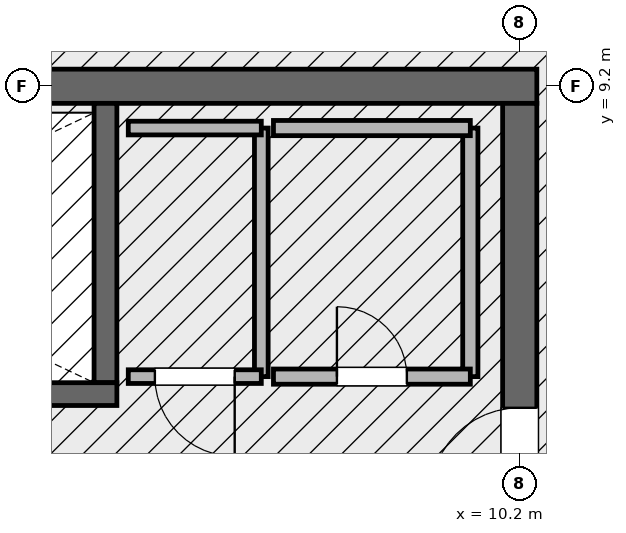
"""IFC4 building model, lengths in metres.
Left out: names, types, materials, properties, quantities, classifications, styles, units other than length and angle.
Written with IfcOpenShell. Run it as: python <this file> out.ifc"""

import sys

from ifc_helpers import new_model, si_unit, direction, frame, frame_2d, origin, place, context, subcontext, project, spatial, rectangle, extrude, element, fill, save


model = new_model("IFC4")
c1 = context("Model", 3, precision=1e-05, world=origin(), true_north=direction((0.0, 1.0)))
c2 = subcontext(c1, "Body", "Model", "MODEL_VIEW")
j1 = project(units=[si_unit("LENGTHUNIT", "METRE"), si_unit("PLANEANGLEUNIT", "RADIAN")], contexts=[c1])
p1 = place(None, origin())
s1 = spatial("IfcSite", under=j1, at=p1, CompositionType="ELEMENT")
p2 = place(p1, origin())
s2 = spatial("IfcBuilding", under=s1, at=p2, CompositionType="ELEMENT")
p3 = place(p2, frame((0.0, 0.0, 334.2)))
s3 = spatial("IfcBuildingStorey", under=s2, at=p3, CompositionType="ELEMENT", Elevation=334.2)
p4 = place(p3, frame((-10.425, 9.2, 0.0), z_axis=(0.0, 0.0, 1.0), x_axis=(1.0, 0.0, 0.0)))
e1 = element("IfcWall", 1, at=p4, inside=s3, PredefinedType="SHEAR", context=c2, shape_type="SweptSolid", body=[
    extrude(rectangle(XDim=20.85, YDim=0.45, at=frame_2d((10.425, 0.0))), origin(), (0.0, 0.0, 1.0), 4.8),
])
p5 = place(p3, frame((10.2, 8.975, 0.0), z_axis=(0.0, 0.0, 1.0), x_axis=(0.0, -1.0, 0.0)))
e2 = element("IfcWall", 2, at=p5, inside=s3, PredefinedType="SHEAR", context=c2, shape_type="SweptSolid", body=[
    extrude(rectangle(XDim=17.95, YDim=0.45, at=frame_2d((8.975, 0.0))), origin(), (0.0, 0.0, 1.0), 4.8),
])
p6 = place(p5, frame((4.005, 0.0, 0.0)))
e3 = element("IfcOpeningElement", 3, at=p6, cuts=e2, PredefinedType="OPENING", context=c2, shape_type="SweptSolid", body=[
    extrude(rectangle(XDim=1.18, YDim=2.2, at=frame_2d((0.59, 1.1))), frame((0.0, 0.235, 0.0), z_axis=(0.0, -1.0, 0.0), x_axis=(1.0, 0.0, 0.0)), (0.0, 0.0, 1.0), 0.47),
])
p7 = place(p3, frame((4.75, 8.975, 0.0), z_axis=(0.0, 0.0, 1.0), x_axis=(0.0, -1.0, 0.0)))
e4 = element("IfcWall", 4, at=p7, inside=s3, PredefinedType="SOLIDWALL", context=c2, shape_type="SweptSolid", body=[
    extrude(rectangle(XDim=3.675, YDim=0.3, at=frame_2d((1.837, 0.0))), origin(), (0.0, 0.0, 1.0), 4.8),
])
p8 = place(p3, frame((-4.9, 5.15, 0.0), z_axis=(0.0, 0.0, 1.0), x_axis=(1.0, 0.0, 0.0)))
e5 = element("IfcWall", 5, at=p8, inside=s3, PredefinedType="SOLIDWALL", context=c2, shape_type="SweptSolid", body=[
    extrude(rectangle(XDim=9.8, YDim=0.3, at=frame_2d((4.9, 0.0))), origin(), (0.0, 0.0, 1.0), 4.8),
])
p9 = place(p8, frame((0.56, 0.0, 0.0)))
e6 = element("IfcOpeningElement", 6, at=p9, cuts=e5, PredefinedType="OPENING", context=c2, shape_type="SweptSolid", body=[
    extrude(rectangle(XDim=1.18, YDim=2.2, at=frame_2d((0.59, 1.1))), frame((0.0, 0.16, 0.0), z_axis=(0.0, -1.0, 0.0), x_axis=(1.0, 0.0, 0.0)), (0.0, 0.0, 1.0), 0.32),
])
p10 = place(p3, frame((6.8, 5.38, 0.0), z_axis=(0.0, 0.0, 1.0), x_axis=(0.0, 1.0, 0.0)))
e7 = element("IfcWall", 7, at=p10, inside=s3, PredefinedType="PARTITIONING", context=c2, shape_type="SweptSolid", body=[
    extrude(rectangle(XDim=3.27, YDim=0.18, at=frame_2d((1.635, 0.0))), origin(), (0.0, 0.0, 1.0), 4.54),
])
p11 = place(p3, frame((6.8, 8.65, 0.0), z_axis=(0.0, 0.0, 1.0), x_axis=(-1.0, 0.0, 0.0)))
e8 = element("IfcWall", 8, at=p11, inside=s3, PredefinedType="PARTITIONING", context=c2, shape_type="SweptSolid", body=[
    extrude(rectangle(XDim=1.75, YDim=0.18, at=frame_2d((0.875, 0.0))), origin(), (0.0, 0.0, 1.0), 4.54),
])
p12 = place(p3, frame((5.05, 5.38, 0.0), z_axis=(0.0, 0.0, 1.0), x_axis=(1.0, 0.0, 0.0)))
e9 = element("IfcWall", 9, at=p12, inside=s3, PredefinedType="PARTITIONING", context=c2, shape_type="SweptSolid", body=[
    extrude(rectangle(XDim=1.75, YDim=0.18, at=frame_2d((0.875, 0.0))), origin(), (0.0, 0.0, 1.0), 4.54),
])
p13 = place(p12, frame((0.35, 0.0, 0.0)))
e10 = element("IfcOpeningElement", 10, at=p13, cuts=e9, PredefinedType="OPENING", context=c2, shape_type="SweptSolid", body=[
    extrude(rectangle(XDim=1.05, YDim=2.2, at=frame_2d((0.525, 1.1))), frame((0.0, 0.1, 0.0), z_axis=(0.0, -1.0, 0.0), x_axis=(1.0, 0.0, 0.0)), (0.0, 0.0, 1.0), 0.2),
])
p14 = place(p3, frame((9.55, 5.38, 0.0), z_axis=(0.0, 0.0, 1.0), x_axis=(0.0, 1.0, 0.0)))
e11 = element("IfcWall", 11, at=p14, inside=s3, PredefinedType="SOLIDWALL", context=c2, shape_type="SweptSolid", body=[
    extrude(rectangle(XDim=3.27, YDim=0.2, at=frame_2d((1.635, 0.0))), origin(), (0.0, 0.0, 1.0), 4.54),
])
p15 = place(p3, frame((9.55, 8.65, 0.0), z_axis=(0.0, 0.0, 1.0), x_axis=(-1.0, 0.0, 0.0)))
e12 = element("IfcWall", 12, at=p15, inside=s3, PredefinedType="SOLIDWALL", context=c2, shape_type="SweptSolid", body=[
    extrude(rectangle(XDim=2.59, YDim=0.2, at=frame_2d((1.295, 0.0))), origin(), (0.0, 0.0, 1.0), 4.54),
])
p16 = place(p3, frame((6.96, 5.38, 0.0), z_axis=(0.0, 0.0, 1.0), x_axis=(1.0, 0.0, 0.0)))
e13 = element("IfcWall", 13, at=p16, inside=s3, PredefinedType="SOLIDWALL", context=c2, shape_type="SweptSolid", body=[
    extrude(rectangle(XDim=2.59, YDim=0.2, at=frame_2d((1.295, 0.0))), origin(), (0.0, 0.0, 1.0), 4.54),
])
p17 = place(p16, frame((0.835, 0.0, 0.0)))
e14 = element("IfcOpeningElement", 14, at=p17, cuts=e13, PredefinedType="OPENING", context=c2, shape_type="SweptSolid", body=[
    extrude(rectangle(XDim=0.92, YDim=2.1, at=frame_2d((0.46, 1.05))), frame((0.0, 0.11, 0.0), z_axis=(0.0, -1.0, 0.0), x_axis=(1.0, 0.0, 0.0)), (0.0, 0.0, 1.0), 0.22),
])
p18 = place(p6, origin())
e15 = element("IfcDoor", 15, at=p18, inside=s3, OperationType="SINGLE_SWING_RIGHT", PredefinedType="DOOR", context=c2, shape_type="SweptSolid", body=[
    extrude(rectangle(XDim=1.18, YDim=2.2, at=frame_2d((0.59, 1.1))), frame((0.0, 0.025, 0.0), z_axis=(0.0, -1.0, 0.0), x_axis=(1.0, 0.0, 0.0)), (0.0, 0.0, 1.0), 0.05),
])
fill(e3, e15)
p19 = place(p13, origin())
e16 = element("IfcDoor", 16, at=p19, inside=s3, OperationType="SINGLE_SWING_RIGHT", PredefinedType="DOOR", context=c2, shape_type="SweptSolid", body=[
    extrude(rectangle(XDim=1.05, YDim=2.2, at=frame_2d((0.525, 1.1))), frame((0.0, 0.025, 0.0), z_axis=(0.0, -1.0, 0.0), x_axis=(1.0, 0.0, 0.0)), (0.0, 0.0, 1.0), 0.05),
])
fill(e10, e16)
p20 = place(p17, origin())
e17 = element("IfcDoor", 17, at=p20, inside=s3, OperationType="SINGLE_SWING_LEFT", PredefinedType="DOOR", context=c2, shape_type="SweptSolid", body=[
    extrude(rectangle(XDim=0.92, YDim=2.1, at=frame_2d((0.46, 1.05))), frame((0.0, 0.025, 0.0), z_axis=(0.0, -1.0, 0.0), x_axis=(1.0, 0.0, 0.0)), (0.0, 0.0, 1.0), 0.05),
])
fill(e14, e17)
save(model, sys.argv[1])
